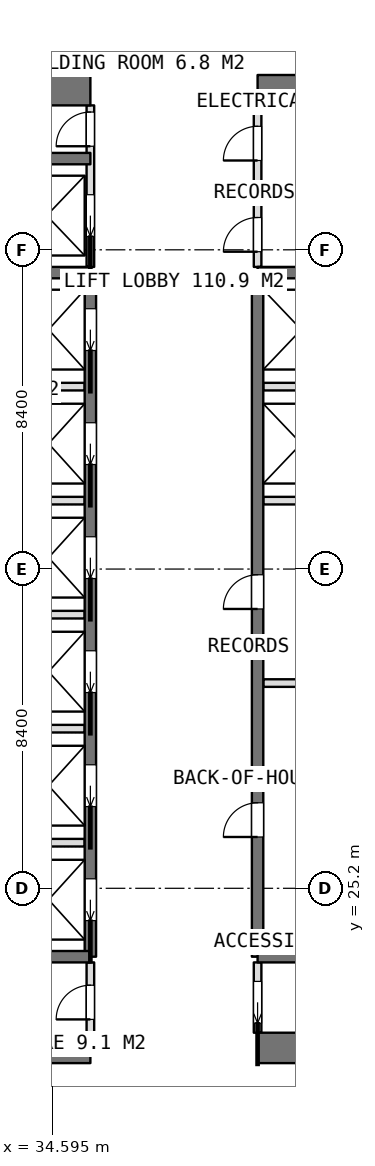
"""IFC4 building model, lengths in metres.
Left out: names, types, materials, properties, quantities, classifications, styles, units other than length and angle.
Written with IfcOpenShell. Run it as: python <this file> out.ifc"""

import sys

from ifc_helpers import new_model, si_unit, direction, frame, frame_2d, origin, place, context, subcontext, project, spatial, rectangle, extrude, element, fill, save


model = new_model("IFC4")
c1 = context("Model", 3, precision=1e-05, world=origin(), true_north=direction((0.0, 1.0)))
c2 = subcontext(c1, "Body", "Model", "MODEL_VIEW")
j1 = project(units=[si_unit("LENGTHUNIT", "METRE"), si_unit("PLANEANGLEUNIT", "RADIAN")], contexts=[c1])
p1 = place(None, origin())
s1 = spatial("IfcSite", under=j1, at=p1, CompositionType="ELEMENT")
p2 = place(p1, origin())
s2 = spatial("IfcBuilding", under=s1, at=p2, CompositionType="ELEMENT")
p3 = place(p2, frame((0.0, 0.0, 283.85)))
s3 = spatial("IfcBuildingStorey", under=s2, at=p3, CompositionType="ELEMENT", Elevation=283.85)
p4 = place(p3, frame((25.2, 21.0, 0.0), z_axis=(0.0, 0.0, 1.0), x_axis=(1.0, 0.0, 0.0)))
e1 = element("IfcWall", 1, at=p4, inside=s3, PredefinedType="SHEAR", context=c2, shape_type="SweptSolid", body=[
    extrude(rectangle(XDim=10.4, YDim=0.8, at=frame_2d((5.2, 0.0))), origin(), (0.0, 0.0, 1.0), 3.75),
])
p5 = place(p3, frame((40.0, 21.0, 0.0), z_axis=(0.0, 0.0, 1.0), x_axis=(1.0, 0.0, 0.0)))
e2 = element("IfcWall", 2, at=p5, inside=s3, PredefinedType="SHEAR", context=c2, shape_type="SweptSolid", body=[
    extrude(rectangle(XDim=10.4, YDim=0.8, at=frame_2d((5.2, 0.0))), origin(), (0.0, 0.0, 1.0), 3.75),
])
p6 = place(p3, frame((25.2, 46.2, 0.0), z_axis=(0.0, 0.0, 1.0), x_axis=(1.0, 0.0, 0.0)))
e3 = element("IfcWall", 3, at=p6, inside=s3, PredefinedType="SHEAR", context=c2, shape_type="SweptSolid", body=[
    extrude(rectangle(XDim=10.4, YDim=0.8, at=frame_2d((5.2, 0.0))), origin(), (0.0, 0.0, 1.0), 3.75),
])
p7 = place(p3, frame((40.0, 46.2, 0.0), z_axis=(0.0, 0.0, 1.0), x_axis=(1.0, 0.0, 0.0)))
e4 = element("IfcWall", 4, at=p7, inside=s3, PredefinedType="SHEAR", context=c2, shape_type="SweptSolid", body=[
    extrude(rectangle(XDim=10.4, YDim=0.8, at=frame_2d((5.2, 0.0))), origin(), (0.0, 0.0, 1.0), 3.75),
])
p8 = place(p3, frame((35.6, 23.4, 0.0), z_axis=(0.0, 0.0, 1.0), x_axis=(0.0, 1.0, 0.0)))
e5 = element("IfcWall", 5, at=p8, inside=s3, PredefinedType="SHEAR", context=c2, shape_type="SweptSolid", body=[
    extrude(rectangle(XDim=18.0, YDim=0.3, at=frame_2d((9.0, 0.0))), origin(), (0.0, 0.0, 1.0), 3.75),
])
p9 = place(p8, frame((0.95, 0.0, 0.0)))
e6 = element("IfcOpeningElement", 6, at=p9, cuts=e5, PredefinedType="OPENING", context=c2, shape_type="SweptSolid", body=[
    extrude(rectangle(XDim=1.1, YDim=2.1, at=frame_2d((0.55, 1.05))), frame((0.0, 0.16, 0.0), z_axis=(0.0, -1.0, 0.0), x_axis=(1.0, 0.0, 0.0)), (0.0, 0.0, 1.0), 0.32),
])
p10 = place(p8, frame((3.95, 0.0, 0.0)))
e7 = element("IfcOpeningElement", 7, at=p10, cuts=e5, PredefinedType="OPENING", context=c2, shape_type="SweptSolid", body=[
    extrude(rectangle(XDim=1.1, YDim=2.1, at=frame_2d((0.55, 1.05))), frame((0.0, 0.16, 0.0), z_axis=(0.0, -1.0, 0.0), x_axis=(1.0, 0.0, 0.0)), (0.0, 0.0, 1.0), 0.32),
])
p11 = place(p8, frame((6.95, 0.0, 0.0)))
e8 = element("IfcOpeningElement", 8, at=p11, cuts=e5, PredefinedType="OPENING", context=c2, shape_type="SweptSolid", body=[
    extrude(rectangle(XDim=1.1, YDim=2.1, at=frame_2d((0.55, 1.05))), frame((0.0, 0.16, 0.0), z_axis=(0.0, -1.0, 0.0), x_axis=(1.0, 0.0, 0.0)), (0.0, 0.0, 1.0), 0.32),
])
p12 = place(p8, frame((9.95, 0.0, 0.0)))
e9 = element("IfcOpeningElement", 9, at=p12, cuts=e5, PredefinedType="OPENING", context=c2, shape_type="SweptSolid", body=[
    extrude(rectangle(XDim=1.1, YDim=2.1, at=frame_2d((0.55, 1.05))), frame((0.0, 0.16, 0.0), z_axis=(0.0, -1.0, 0.0), x_axis=(1.0, 0.0, 0.0)), (0.0, 0.0, 1.0), 0.32),
])
p13 = place(p8, frame((12.95, 0.0, 0.0)))
e10 = element("IfcOpeningElement", 10, at=p13, cuts=e5, PredefinedType="OPENING", context=c2, shape_type="SweptSolid", body=[
    extrude(rectangle(XDim=1.1, YDim=2.1, at=frame_2d((0.55, 1.05))), frame((0.0, 0.16, 0.0), z_axis=(0.0, -1.0, 0.0), x_axis=(1.0, 0.0, 0.0)), (0.0, 0.0, 1.0), 0.32),
])
p14 = place(p8, frame((15.95, 0.0, 0.0)))
e11 = element("IfcOpeningElement", 11, at=p14, cuts=e5, PredefinedType="OPENING", context=c2, shape_type="SweptSolid", body=[
    extrude(rectangle(XDim=1.1, YDim=2.1, at=frame_2d((0.55, 1.05))), frame((0.0, 0.16, 0.0), z_axis=(0.0, -1.0, 0.0), x_axis=(1.0, 0.0, 0.0)), (0.0, 0.0, 1.0), 0.32),
])
p15 = place(p3, frame((40.0, 23.4, 0.0), z_axis=(0.0, 0.0, 1.0), x_axis=(0.0, 1.0, 0.0)))
e12 = element("IfcWall", 12, at=p15, inside=s3, PredefinedType="SHEAR", context=c2, shape_type="SweptSolid", body=[
    extrude(rectangle(XDim=18.0, YDim=0.3, at=frame_2d((9.0, 0.0))), origin(), (0.0, 0.0, 1.0), 3.75),
])
p16 = place(p15, frame((3.15, 0.0, 0.0)))
e13 = element("IfcOpeningElement", 13, at=p16, cuts=e12, PredefinedType="OPENING", context=c2, shape_type="SweptSolid", body=[
    extrude(rectangle(XDim=0.9, YDim=2.1, at=frame_2d((0.45, 1.05))), frame((0.0, 0.16, 0.0), z_axis=(0.0, -1.0, 0.0), x_axis=(1.0, 0.0, 0.0)), (0.0, 0.0, 1.0), 0.32),
])
p17 = place(p15, frame((9.15, 0.0, 0.0)))
e14 = element("IfcOpeningElement", 14, at=p17, cuts=e12, PredefinedType="OPENING", context=c2, shape_type="SweptSolid", body=[
    extrude(rectangle(XDim=0.9, YDim=2.1, at=frame_2d((0.45, 1.05))), frame((0.0, 0.16, 0.0), z_axis=(0.0, -1.0, 0.0), x_axis=(1.0, 0.0, 0.0)), (0.0, 0.0, 1.0), 0.32),
])
for number, where, z_axis, x_axis in (
    (15, (31.8, 23.4, 0.0), (0.0, 0.0, 1.0), (1.0, 0.0, 0.0)),
    (16, (31.8, 41.4, 0.0), (0.0, 0.0, 1.0), (1.0, 0.0, 0.0)),
    (17, (31.8, 44.4, 0.0), (0.0, 0.0, 1.0), (1.0, 0.0, 0.0)),
    (18, (40.0, 23.4, 0.0), (0.0, 0.0, 1.0), (1.0, 0.0, 0.0)),
    (19, (40.0, 41.4, 0.0), (0.0, 0.0, 1.0), (1.0, 0.0, 0.0)),
):
    element("IfcWall", number, at=place(p3, frame(where, z_axis=z_axis, x_axis=x_axis)), inside=s3, PredefinedType="SHEAR", context=c2, shape_type="SweptSolid", body=[
        extrude(rectangle(XDim=3.8, YDim=0.3, at=frame_2d((1.9, 0.0))), origin(), (0.0, 0.0, 1.0), 3.75),
    ])
for number, where, z_axis, x_axis in (
    (20, (31.95, 26.4, 0.0), (0.0, 0.0, 1.0), (1.0, 0.0, 0.0)),
    (21, (31.95, 29.4, 0.0), (0.0, 0.0, 1.0), (1.0, 0.0, 0.0)),
    (22, (31.95, 32.4, 0.0), (0.0, 0.0, 1.0), (1.0, 0.0, 0.0)),
    (23, (31.95, 35.4, 0.0), (0.0, 0.0, 1.0), (1.0, 0.0, 0.0)),
    (24, (31.95, 38.4, 0.0), (0.0, 0.0, 1.0), (1.0, 0.0, 0.0)),
    (25, (40.15, 35.4, 0.0), (0.0, 0.0, 1.0), (1.0, 0.0, 0.0)),
    (26, (40.15, 38.4, 0.0), (0.0, 0.0, 1.0), (1.0, 0.0, 0.0)),
):
    element("IfcWall", number, at=place(p3, frame(where, z_axis=z_axis, x_axis=x_axis)), inside=s3, PredefinedType="PARTITIONING", context=c2, shape_type="SweptSolid", body=[
        extrude(rectangle(XDim=3.5, YDim=0.2, at=frame_2d((1.75, 0.0))), origin(), (0.0, 0.0, 1.0), 3.5),
    ])
p18 = place(p3, frame((40.0, 21.4, 0.0), z_axis=(0.0, 0.0, 1.0), x_axis=(0.0, 1.0, 0.0)))
e27 = element("IfcWall", 27, at=p18, inside=s3, PredefinedType="PARTITIONING", context=c2, shape_type="SweptSolid", body=[
    extrude(rectangle(XDim=1.85, YDim=0.2, at=frame_2d((0.925, 0.0))), origin(), (0.0, 0.0, 1.0), 3.5),
])
p19 = place(p18, frame((0.25, 0.0, 0.0)))
e28 = element("IfcOpeningElement", 28, at=p19, cuts=e27, PredefinedType="OPENING", context=c2, shape_type="SweptSolid", body=[
    extrude(rectangle(XDim=1.1, YDim=2.1, at=frame_2d((0.55, 1.05))), frame((0.0, 0.11, 0.0), z_axis=(0.0, -1.0, 0.0), x_axis=(1.0, 0.0, 0.0)), (0.0, 0.0, 1.0), 0.22),
])
p20 = place(p3, frame((40.0, 41.55, 0.0), z_axis=(0.0, 0.0, 1.0), x_axis=(0.0, 1.0, 0.0)))
e29 = element("IfcWall", 29, at=p20, inside=s3, PredefinedType="PARTITIONING", context=c2, shape_type="SweptSolid", body=[
    extrude(rectangle(XDim=4.25, YDim=0.2, at=frame_2d((2.125, 0.0))), origin(), (0.0, 0.0, 1.0), 3.5),
])
p21 = place(p20, frame((2.8, 0.0, 0.0)))
e30 = element("IfcOpeningElement", 30, at=p21, cuts=e29, PredefinedType="OPENING", context=c2, shape_type="SweptSolid", body=[
    extrude(rectangle(XDim=0.9, YDim=2.1, at=frame_2d((0.45, 1.05))), frame((0.0, 0.11, 0.0), z_axis=(0.0, -1.0, 0.0), x_axis=(1.0, 0.0, 0.0)), (0.0, 0.0, 1.0), 0.22),
])
p22 = place(p20, frame((0.4, 0.0, 0.0)))
e31 = element("IfcOpeningElement", 31, at=p22, cuts=e29, PredefinedType="OPENING", context=c2, shape_type="SweptSolid", body=[
    extrude(rectangle(XDim=0.9, YDim=2.1, at=frame_2d((0.45, 1.05))), frame((0.0, 0.11, 0.0), z_axis=(0.0, -1.0, 0.0), x_axis=(1.0, 0.0, 0.0)), (0.0, 0.0, 1.0), 0.22),
])
p23 = place(p3, frame((35.6, 41.55, 0.0), z_axis=(0.0, 0.0, 1.0), x_axis=(0.0, 1.0, 0.0)))
e32 = element("IfcWall", 32, at=p23, inside=s3, PredefinedType="PARTITIONING", context=c2, shape_type="SweptSolid", body=[
    extrude(rectangle(XDim=4.25, YDim=0.2, at=frame_2d((2.125, 0.0))), origin(), (0.0, 0.0, 1.0), 3.5),
])
p24 = place(p23, frame((3.175, 0.0, 0.0)))
e33 = element("IfcOpeningElement", 33, at=p24, cuts=e32, PredefinedType="OPENING", context=c2, shape_type="SweptSolid", body=[
    extrude(rectangle(XDim=0.9, YDim=2.1, at=frame_2d((0.45, 1.05))), frame((0.0, 0.11, 0.0), z_axis=(0.0, -1.0, 0.0), x_axis=(1.0, 0.0, 0.0)), (0.0, 0.0, 1.0), 0.22),
])
p25 = place(p23, frame((0.8, 0.0, 0.0)))
e34 = element("IfcOpeningElement", 34, at=p25, cuts=e32, PredefinedType="OPENING", context=c2, shape_type="SweptSolid", body=[
    extrude(rectangle(XDim=1.1, YDim=2.1, at=frame_2d((0.55, 1.05))), frame((0.0, 0.11, 0.0), z_axis=(0.0, -1.0, 0.0), x_axis=(1.0, 0.0, 0.0)), (0.0, 0.0, 1.0), 0.22),
])
p26 = place(p3, frame((35.6, 21.4, 0.0), z_axis=(0.0, 0.0, 1.0), x_axis=(0.0, 1.0, 0.0)))
e35 = element("IfcWall", 35, at=p26, inside=s3, PredefinedType="PARTITIONING", context=c2, shape_type="SweptSolid", body=[
    extrude(rectangle(XDim=1.85, YDim=0.2, at=frame_2d((0.925, 0.0))), origin(), (0.0, 0.0, 1.0), 3.5),
])
p27 = place(p26, frame((0.35, 0.0, 0.0)))
e36 = element("IfcOpeningElement", 36, at=p27, cuts=e35, PredefinedType="OPENING", context=c2, shape_type="SweptSolid", body=[
    extrude(rectangle(XDim=0.9, YDim=2.1, at=frame_2d((0.45, 1.05))), frame((0.0, 0.11, 0.0), z_axis=(0.0, -1.0, 0.0), x_axis=(1.0, 0.0, 0.0)), (0.0, 0.0, 1.0), 0.22),
])
p28 = place(p3, frame((40.15, 30.6, 0.0), z_axis=(0.0, 0.0, 1.0), x_axis=(1.0, 0.0, 0.0)))
e37 = element("IfcWall", 37, at=p28, inside=s3, PredefinedType="PARTITIONING", context=c2, shape_type="SweptSolid", body=[
    extrude(rectangle(XDim=3.5, YDim=0.2, at=frame_2d((1.75, 0.0))), origin(), (0.0, 0.0, 1.0), 3.5),
])
p29 = place(p3, frame((40.0, 43.4, 0.0), z_axis=(0.0, 0.0, 1.0), x_axis=(1.0, 0.0, 0.0)))
e38 = element("IfcWall", 38, at=p29, inside=s3, PredefinedType="PARTITIONING", context=c2, shape_type="SweptSolid", body=[
    extrude(rectangle(XDim=3.65, YDim=0.2, at=frame_2d((1.825, 0.0))), origin(), (0.0, 0.0, 1.0), 3.5),
])
p30 = place(p19, origin())
e39 = element("IfcDoor", 39, at=p30, inside=s3, OperationType="SLIDING_TO_LEFT", PredefinedType="DOOR", context=c2, shape_type="SweptSolid", body=[
    extrude(rectangle(XDim=1.1, YDim=2.1, at=frame_2d((0.55, 1.05))), frame((0.0, 0.025, 0.0), z_axis=(0.0, -1.0, 0.0), x_axis=(1.0, 0.0, 0.0)), (0.0, 0.0, 1.0), 0.05),
])
fill(e28, e39)
p31 = place(p27, origin())
e40 = element("IfcDoor", 40, at=p31, inside=s3, OperationType="SINGLE_SWING_LEFT", PredefinedType="DOOR", context=c2, shape_type="SweptSolid", body=[
    extrude(rectangle(XDim=0.9, YDim=2.1, at=frame_2d((0.45, 1.05))), frame((0.0, 0.025, 0.0), z_axis=(0.0, -1.0, 0.0), x_axis=(1.0, 0.0, 0.0)), (0.0, 0.0, 1.0), 0.05),
])
fill(e36, e40)
p32 = place(p21, origin())
e41 = element("IfcDoor", 41, at=p32, inside=s3, OperationType="SINGLE_SWING_LEFT", PredefinedType="DOOR", context=c2, shape_type="SweptSolid", body=[
    extrude(rectangle(XDim=0.9, YDim=2.1, at=frame_2d((0.45, 1.05))), frame((0.0, 0.025, 0.0), z_axis=(0.0, -1.0, 0.0), x_axis=(1.0, 0.0, 0.0)), (0.0, 0.0, 1.0), 0.05),
])
fill(e30, e41)
p33 = place(p22, origin())
e42 = element("IfcDoor", 42, at=p33, inside=s3, OperationType="SINGLE_SWING_LEFT", PredefinedType="DOOR", context=c2, shape_type="SweptSolid", body=[
    extrude(rectangle(XDim=0.9, YDim=2.1, at=frame_2d((0.45, 1.05))), frame((0.0, 0.025, 0.0), z_axis=(0.0, -1.0, 0.0), x_axis=(1.0, 0.0, 0.0)), (0.0, 0.0, 1.0), 0.05),
])
fill(e31, e42)
p34 = place(p16, origin())
e43 = element("IfcDoor", 43, at=p34, inside=s3, OperationType="SINGLE_SWING_LEFT", PredefinedType="DOOR", context=c2, shape_type="SweptSolid", body=[
    extrude(rectangle(XDim=0.9, YDim=2.1, at=frame_2d((0.45, 1.05))), frame((0.0, 0.025, 0.0), z_axis=(0.0, -1.0, 0.0), x_axis=(1.0, 0.0, 0.0)), (0.0, 0.0, 1.0), 0.05),
])
fill(e13, e43)
p35 = place(p17, origin())
e44 = element("IfcDoor", 44, at=p35, inside=s3, OperationType="SINGLE_SWING_LEFT", PredefinedType="DOOR", context=c2, shape_type="SweptSolid", body=[
    extrude(rectangle(XDim=0.9, YDim=2.1, at=frame_2d((0.45, 1.05))), frame((0.0, 0.025, 0.0), z_axis=(0.0, -1.0, 0.0), x_axis=(1.0, 0.0, 0.0)), (0.0, 0.0, 1.0), 0.05),
])
fill(e14, e44)
p36 = place(p24, origin())
e45 = element("IfcDoor", 45, at=p36, inside=s3, OperationType="SINGLE_SWING_LEFT", PredefinedType="DOOR", context=c2, shape_type="SweptSolid", body=[
    extrude(rectangle(XDim=0.9, YDim=2.1, at=frame_2d((0.45, 1.05))), frame((0.0, 0.025, 0.0), z_axis=(0.0, -1.0, 0.0), x_axis=(1.0, 0.0, 0.0)), (0.0, 0.0, 1.0), 0.05),
])
fill(e33, e45)
p37 = place(p9, origin())
e46 = element("IfcDoor", 46, at=p37, inside=s3, OperationType="SLIDING_TO_LEFT", PredefinedType="USERDEFINED", context=c2, shape_type="SweptSolid", body=[
    extrude(rectangle(XDim=1.1, YDim=2.1, at=frame_2d((0.55, 1.05))), frame((0.0, 0.025, 0.0), z_axis=(0.0, -1.0, 0.0), x_axis=(1.0, 0.0, 0.0)), (0.0, 0.0, 1.0), 0.05),
])
fill(e6, e46)
p38 = place(p10, origin())
e47 = element("IfcDoor", 47, at=p38, inside=s3, OperationType="SLIDING_TO_LEFT", PredefinedType="USERDEFINED", context=c2, shape_type="SweptSolid", body=[
    extrude(rectangle(XDim=1.1, YDim=2.1, at=frame_2d((0.55, 1.05))), frame((0.0, 0.025, 0.0), z_axis=(0.0, -1.0, 0.0), x_axis=(1.0, 0.0, 0.0)), (0.0, 0.0, 1.0), 0.05),
])
fill(e7, e47)
p39 = place(p11, origin())
e48 = element("IfcDoor", 48, at=p39, inside=s3, OperationType="SLIDING_TO_LEFT", PredefinedType="USERDEFINED", context=c2, shape_type="SweptSolid", body=[
    extrude(rectangle(XDim=1.1, YDim=2.1, at=frame_2d((0.55, 1.05))), frame((0.0, 0.025, 0.0), z_axis=(0.0, -1.0, 0.0), x_axis=(1.0, 0.0, 0.0)), (0.0, 0.0, 1.0), 0.05),
])
fill(e8, e48)
p40 = place(p12, origin())
e49 = element("IfcDoor", 49, at=p40, inside=s3, OperationType="SLIDING_TO_LEFT", PredefinedType="USERDEFINED", context=c2, shape_type="SweptSolid", body=[
    extrude(rectangle(XDim=1.1, YDim=2.1, at=frame_2d((0.55, 1.05))), frame((0.0, 0.025, 0.0), z_axis=(0.0, -1.0, 0.0), x_axis=(1.0, 0.0, 0.0)), (0.0, 0.0, 1.0), 0.05),
])
fill(e9, e49)
p41 = place(p13, origin())
e50 = element("IfcDoor", 50, at=p41, inside=s3, OperationType="SLIDING_TO_LEFT", PredefinedType="USERDEFINED", context=c2, shape_type="SweptSolid", body=[
    extrude(rectangle(XDim=1.1, YDim=2.1, at=frame_2d((0.55, 1.05))), frame((0.0, 0.025, 0.0), z_axis=(0.0, -1.0, 0.0), x_axis=(1.0, 0.0, 0.0)), (0.0, 0.0, 1.0), 0.05),
])
fill(e10, e50)
p42 = place(p14, origin())
e51 = element("IfcDoor", 51, at=p42, inside=s3, OperationType="SLIDING_TO_LEFT", PredefinedType="USERDEFINED", context=c2, shape_type="SweptSolid", body=[
    extrude(rectangle(XDim=1.1, YDim=2.1, at=frame_2d((0.55, 1.05))), frame((0.0, 0.025, 0.0), z_axis=(0.0, -1.0, 0.0), x_axis=(1.0, 0.0, 0.0)), (0.0, 0.0, 1.0), 0.05),
])
fill(e11, e51)
p43 = place(p25, origin())
e52 = element("IfcDoor", 52, at=p43, inside=s3, OperationType="SLIDING_TO_LEFT", PredefinedType="USERDEFINED", context=c2, shape_type="SweptSolid", body=[
    extrude(rectangle(XDim=1.1, YDim=2.1, at=frame_2d((0.55, 1.05))), frame((0.0, 0.025, 0.0), z_axis=(0.0, -1.0, 0.0), x_axis=(1.0, 0.0, 0.0)), (0.0, 0.0, 1.0), 0.05),
])
fill(e34, e52)
save(model, sys.argv[1])
